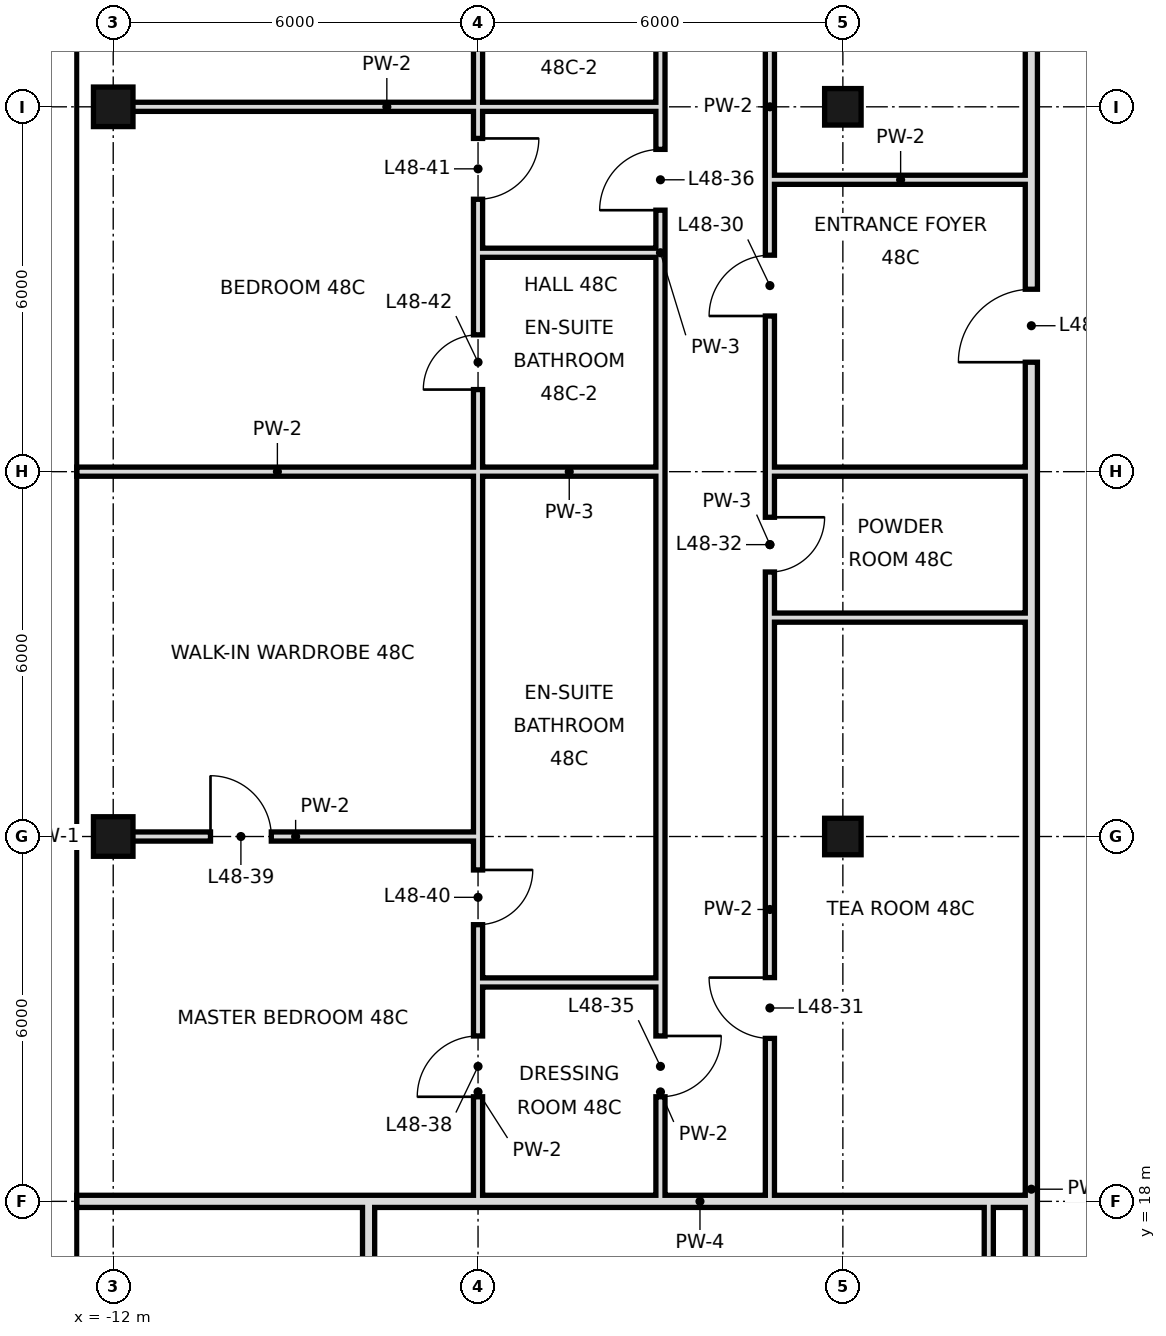
"""IFC4 building model, lengths in metres.
Left out: names, types, materials, properties, quantities, classifications, styles, units other than length and angle.
Written with IfcOpenShell. Run it as: python <this file> out.ifc"""

import sys

from ifc_helpers import new_model, si_unit, direction, frame, frame_2d, origin, origin_2d, place, context, subcontext, project, spatial, rectangle, hollow_rectangle, extrude, element, fill, save


model = new_model("IFC4")
c1 = context("Model", 3, precision=1e-05, world=origin(), true_north=direction((0.0, 1.0)))
c2 = subcontext(c1, "Body", "Model", "MODEL_VIEW")
j1 = project(units=[si_unit("LENGTHUNIT", "METRE"), si_unit("PLANEANGLEUNIT", "RADIAN")], contexts=[c1])
p1 = place(None, origin())
s1 = spatial("IfcSite", under=j1, at=p1, CompositionType="ELEMENT")
p2 = place(p1, origin())
s2 = spatial("IfcBuilding", under=s1, at=p2, CompositionType="ELEMENT")
p3 = place(p2, frame((0.0, 0.0, 206.4)))
s3 = spatial("IfcBuildingStorey", under=s2, at=p3, CompositionType="ELEMENT", Elevation=206.4)
for number, where, z_axis, x_axis in (
    (1, (-12.0, 24.0, 0.0), (0.0, 0.0, 1.0), (1.0, 0.0, 0.0)),
    (2, (-12.0, 36.0, 0.0), (0.0, 0.0, 1.0), (1.0, 0.0, 0.0)),
):
    element("IfcColumn", number, at=place(p3, frame(where, z_axis=z_axis, x_axis=x_axis)), inside=s3, PredefinedType="COLUMN", context=c2, shape_type="SweptSolid", body=[
        extrude(hollow_rectangle(XDim=0.65, YDim=0.65, WallThickness=0.032, at=origin_2d()), origin(), (0.0, 0.0, 1.0), 3.6),
    ])
for number, where, z_axis, x_axis in (
    (3, (0.0, 24.0, 0.0), (0.0, 0.0, 1.0), (1.0, 0.0, 0.0)),
    (4, (0.0, 36.0, 0.0), (0.0, 0.0, 1.0), (1.0, 0.0, 0.0)),
):
    element("IfcColumn", number, at=place(p3, frame(where, z_axis=z_axis, x_axis=x_axis)), inside=s3, PredefinedType="COLUMN", context=c2, shape_type="SweptSolid", body=[
        extrude(hollow_rectangle(XDim=0.6, YDim=0.6, WallThickness=0.028, at=origin_2d()), origin(), (0.0, 0.0, 1.0), 3.6),
    ])
p4 = place(p3, frame((-1.2, 18.0, 0.0), z_axis=(0.0, 0.0, 1.0), x_axis=(0.0, 1.0, 0.0)))
e5 = element("IfcWall", 5, at=p4, inside=s3, PredefinedType="PARTITIONING", context=c2, shape_type="SweptSolid", body=[
    extrude(rectangle(XDim=9.6, YDim=0.15, at=frame_2d((4.8, 0.0))), origin(), (0.0, 0.0, 1.0), 3.38),
])
p5 = place(p4, frame((2.68, 0.0, 0.0)))
e6 = element("IfcOpeningElement", 6, at=p5, cuts=e5, PredefinedType="OPENING", context=c2, shape_type="SweptSolid", body=[
    extrude(rectangle(XDim=1.0, YDim=2.4, at=frame_2d((0.5, 1.2))), frame((0.0, 0.085, 0.0), z_axis=(0.0, -1.0, 0.0), x_axis=(1.0, 0.0, 0.0)), (0.0, 0.0, 1.0), 0.17),
])
p6 = place(p3, frame((-1.2, 30.0, 0.0), z_axis=(0.0, 0.0, 1.0), x_axis=(0.0, 1.0, 0.0)))
e7 = element("IfcWall", 7, at=p6, inside=s3, PredefinedType="PARTITIONING", context=c2, shape_type="SweptSolid", body=[
    extrude(rectangle(XDim=12.0, YDim=0.15, at=frame_2d((6.0, 0.0))), origin(), (0.0, 0.0, 1.0), 3.38),
])
p7 = place(p6, frame((2.56, 0.0, 0.0)))
e8 = element("IfcOpeningElement", 8, at=p7, cuts=e7, PredefinedType="OPENING", context=c2, shape_type="SweptSolid", body=[
    extrude(rectangle(XDim=1.0, YDim=2.4, at=frame_2d((0.5, 1.2))), frame((0.0, 0.085, 0.0), z_axis=(0.0, -1.0, 0.0), x_axis=(1.0, 0.0, 0.0)), (0.0, 0.0, 1.0), 0.17),
])
p8 = place(p6, frame((9.04, 0.0, 0.0)))
e9 = element("IfcOpeningElement", 9, at=p8, cuts=e7, PredefinedType="OPENING", context=c2, shape_type="SweptSolid", body=[
    extrude(rectangle(XDim=1.0, YDim=2.4, at=frame_2d((0.5, 1.2))), frame((0.0, 0.085, 0.0), z_axis=(0.0, -1.0, 0.0), x_axis=(1.0, 0.0, 0.0)), (0.0, 0.0, 1.0), 0.17),
])
p9 = place(p3, frame((-1.2, 27.6, 0.0), z_axis=(0.0, 0.0, 1.0), x_axis=(0.0, 1.0, 0.0)))
e10 = element("IfcWall", 10, at=p9, inside=s3, PredefinedType="PARTITIONING", context=c2, shape_type="SweptSolid", body=[
    extrude(rectangle(XDim=2.4, YDim=0.15, at=frame_2d((1.2, 0.0))), origin(), (0.0, 0.0, 1.0), 3.38),
])
p10 = place(p9, frame((0.75, 0.0, 0.0)))
e11 = element("IfcOpeningElement", 11, at=p10, cuts=e10, PredefinedType="OPENING", context=c2, shape_type="SweptSolid", body=[
    extrude(rectangle(XDim=0.9, YDim=2.4, at=frame_2d((0.45, 1.2))), frame((0.0, 0.085, 0.0), z_axis=(0.0, -1.0, 0.0), x_axis=(1.0, 0.0, 0.0)), (0.0, 0.0, 1.0), 0.17),
])
p11 = place(p3, frame((-3.0, 18.0, 0.0), z_axis=(0.0, 0.0, 1.0), x_axis=(0.0, 1.0, 0.0)))
e12 = element("IfcWall", 12, at=p11, inside=s3, PredefinedType="PARTITIONING", context=c2, shape_type="SweptSolid", body=[
    extrude(rectangle(XDim=3.6, YDim=0.15, at=frame_2d((1.8, 0.0))), origin(), (0.0, 0.0, 1.0), 3.38),
])
p12 = place(p11, frame((1.72, 0.0, 0.0)))
e13 = element("IfcOpeningElement", 13, at=p12, cuts=e12, PredefinedType="OPENING", context=c2, shape_type="SweptSolid", body=[
    extrude(rectangle(XDim=1.0, YDim=2.4, at=frame_2d((0.5, 1.2))), frame((0.0, 0.085, 0.0), z_axis=(0.0, -1.0, 0.0), x_axis=(1.0, 0.0, 0.0)), (0.0, 0.0, 1.0), 0.17),
])
p13 = place(p3, frame((-3.0, 33.6, 0.0), z_axis=(0.0, 0.0, 1.0), x_axis=(0.0, 1.0, 0.0)))
e14 = element("IfcWall", 14, at=p13, inside=s3, PredefinedType="PARTITIONING", context=c2, shape_type="SweptSolid", body=[
    extrude(rectangle(XDim=15.0, YDim=0.15, at=frame_2d((7.5, 0.0))), origin(), (0.0, 0.0, 1.0), 3.38),
])
p14 = place(p13, frame((0.7, 0.0, 0.0)))
e15 = element("IfcOpeningElement", 15, at=p14, cuts=e14, PredefinedType="OPENING", context=c2, shape_type="SweptSolid", body=[
    extrude(rectangle(XDim=1.0, YDim=2.4, at=frame_2d((0.5, 1.2))), frame((0.0, 0.085, 0.0), z_axis=(0.0, -1.0, 0.0), x_axis=(1.0, 0.0, 0.0)), (0.0, 0.0, 1.0), 0.17),
])
p15 = place(p13, frame((5.56, 0.0, 0.0)))
e16 = element("IfcOpeningElement", 16, at=p15, cuts=e14, PredefinedType="OPENING", context=c2, shape_type="SweptSolid", body=[
    extrude(rectangle(XDim=1.8, YDim=2.4, at=frame_2d((0.9, 1.2))), frame((0.0, 0.085, 0.0), z_axis=(0.0, -1.0, 0.0), x_axis=(1.0, 0.0, 0.0)), (0.0, 0.0, 1.0), 0.17),
])
p16 = place(p3, frame((-3.0, 21.6, 0.0), z_axis=(0.0, 0.0, 1.0), x_axis=(0.0, 1.0, 0.0)))
e17 = element("IfcWall", 17, at=p16, inside=s3, PredefinedType="PARTITIONING", context=c2, shape_type="SweptSolid", body=[
    extrude(rectangle(XDim=12.0, YDim=0.15, at=frame_2d((6.0, 0.0))), origin(), (0.0, 0.0, 1.0), 3.38),
])
p17 = place(p3, frame((-6.0, 18.0, 0.0), z_axis=(0.0, 0.0, 1.0), x_axis=(0.0, 1.0, 0.0)))
e18 = element("IfcWall", 18, at=p17, inside=s3, PredefinedType="PARTITIONING", context=c2, shape_type="SweptSolid", body=[
    extrude(rectangle(XDim=3.6, YDim=0.15, at=frame_2d((1.8, 0.0))), origin(), (0.0, 0.0, 1.0), 3.38),
])
p18 = place(p17, frame((1.72, 0.0, 0.0)))
e19 = element("IfcOpeningElement", 19, at=p18, cuts=e18, PredefinedType="OPENING", context=c2, shape_type="SweptSolid", body=[
    extrude(rectangle(XDim=1.0, YDim=2.4, at=frame_2d((0.5, 1.2))), frame((0.0, 0.085, 0.0), z_axis=(0.0, -1.0, 0.0), x_axis=(1.0, 0.0, 0.0)), (0.0, 0.0, 1.0), 0.17),
])
p19 = place(p3, frame((-6.0, 33.6, 0.0), z_axis=(0.0, 0.0, 1.0), x_axis=(0.0, 1.0, 0.0)))
e20 = element("IfcWall", 20, at=p19, inside=s3, PredefinedType="PARTITIONING", context=c2, shape_type="SweptSolid", body=[
    extrude(rectangle(XDim=14.4, YDim=0.15, at=frame_2d((7.2, 0.0))), origin(), (0.0, 0.0, 1.0), 3.38),
])
p20 = place(p19, frame((0.88, 0.0, 0.0)))
e21 = element("IfcOpeningElement", 21, at=p20, cuts=e20, PredefinedType="OPENING", context=c2, shape_type="SweptSolid", body=[
    extrude(rectangle(XDim=1.0, YDim=2.4, at=frame_2d((0.5, 1.2))), frame((0.0, 0.085, 0.0), z_axis=(0.0, -1.0, 0.0), x_axis=(1.0, 0.0, 0.0)), (0.0, 0.0, 1.0), 0.17),
])
p21 = place(p19, frame((5.56, 0.0, 0.0)))
e22 = element("IfcOpeningElement", 22, at=p21, cuts=e20, PredefinedType="OPENING", context=c2, shape_type="SweptSolid", body=[
    extrude(rectangle(XDim=1.8, YDim=2.4, at=frame_2d((0.9, 1.2))), frame((0.0, 0.085, 0.0), z_axis=(0.0, -1.0, 0.0), x_axis=(1.0, 0.0, 0.0)), (0.0, 0.0, 1.0), 0.17),
])
p22 = place(p3, frame((-6.0, 21.6, 0.0), z_axis=(0.0, 0.0, 1.0), x_axis=(0.0, 1.0, 0.0)))
e23 = element("IfcWall", 23, at=p22, inside=s3, PredefinedType="PARTITIONING", context=c2, shape_type="SweptSolid", body=[
    extrude(rectangle(XDim=12.0, YDim=0.15, at=frame_2d((6.0, 0.0))), origin(), (0.0, 0.0, 1.0), 3.38),
])
p23 = place(p22, frame((0.95, 0.0, 0.0)))
e24 = element("IfcOpeningElement", 24, at=p23, cuts=e23, PredefinedType="OPENING", context=c2, shape_type="SweptSolid", body=[
    extrude(rectangle(XDim=0.9, YDim=2.4, at=frame_2d((0.45, 1.2))), frame((0.0, 0.085, 0.0), z_axis=(0.0, -1.0, 0.0), x_axis=(1.0, 0.0, 0.0)), (0.0, 0.0, 1.0), 0.17),
])
p24 = place(p22, frame((9.75, 0.0, 0.0)))
e25 = element("IfcOpeningElement", 25, at=p24, cuts=e23, PredefinedType="OPENING", context=c2, shape_type="SweptSolid", body=[
    extrude(rectangle(XDim=0.9, YDim=2.4, at=frame_2d((0.45, 1.2))), frame((0.0, 0.085, 0.0), z_axis=(0.0, -1.0, 0.0), x_axis=(1.0, 0.0, 0.0)), (0.0, 0.0, 1.0), 0.17),
])
p25 = place(p3, frame((-7.8, 10.8, 0.0), z_axis=(0.0, 0.0, 1.0), x_axis=(0.0, 1.0, 0.0)))
e26 = element("IfcWall", 26, at=p25, inside=s3, PredefinedType="SOLIDWALL", context=c2, shape_type="SweptSolid", body=[
    extrude(rectangle(XDim=7.2, YDim=0.2, at=frame_2d((3.6, 0.0))), origin(), (0.0, 0.0, 1.0), 2.68),
])
p26 = place(p3, frame((2.4, 10.8, 0.0), z_axis=(0.0, 0.0, 1.0), x_axis=(0.0, 1.0, 0.0)))
e27 = element("IfcWall", 27, at=p26, inside=s3, PredefinedType="PARTITIONING", context=c2, shape_type="SweptSolid", body=[
    extrude(rectangle(XDim=7.2, YDim=0.15, at=frame_2d((3.6, 0.0))), origin(), (0.0, 0.0, 1.0), 3.38),
])
p27 = place(p3, frame((3.1, 15.3, 0.0), z_axis=(0.0, 0.0, 1.0), x_axis=(0.0, 1.0, 0.0)))
e28 = element("IfcWall", 28, at=p27, inside=s3, PredefinedType="SOLIDWALL", context=c2, shape_type="SweptSolid", body=[
    extrude(rectangle(XDim=26.7, YDim=0.2, at=frame_2d((13.35, 0.0))), origin(), (0.0, 0.0, 1.0), 2.93),
])
p28 = place(p27, frame((16.5, 0.0, 0.0)))
e29 = element("IfcOpeningElement", 29, at=p28, cuts=e28, PredefinedType="OPENING", context=c2, shape_type="SweptSolid", body=[
    extrude(rectangle(XDim=1.2, YDim=2.4, at=frame_2d((0.6, 1.2))), frame((0.0, 0.11, 0.0), z_axis=(0.0, -1.0, 0.0), x_axis=(1.0, 0.0, 0.0)), (0.0, 0.0, 1.0), 0.22),
])
p29 = place(p3, frame((-12.6, 18.0, 0.0), z_axis=(0.0, 0.0, 1.0), x_axis=(1.0, 0.0, 0.0)))
e30 = element("IfcWall", 30, at=p29, inside=s3, PredefinedType="SOLIDWALL", context=c2, shape_type="SweptSolid", body=[
    extrude(rectangle(XDim=4.8, YDim=0.2, at=frame_2d((2.4, 0.0))), origin(), (0.0, 0.0, 1.0), 2.68),
])
p30 = place(p3, frame((-7.8, 18.0, 0.0), z_axis=(0.0, 0.0, 1.0), x_axis=(1.0, 0.0, 0.0)))
e31 = element("IfcWall", 31, at=p30, inside=s3, PredefinedType="SOLIDWALL", context=c2, shape_type="SweptSolid", body=[
    extrude(rectangle(XDim=10.9, YDim=0.2, at=frame_2d((5.45, 0.0))), origin(), (0.0, 0.0, 1.0), 2.68),
])
p31 = place(p3, frame((-6.0, 21.6, 0.0), z_axis=(0.0, 0.0, 1.0), x_axis=(1.0, 0.0, 0.0)))
e32 = element("IfcWall", 32, at=p31, inside=s3, PredefinedType="PARTITIONING", context=c2, shape_type="SweptSolid", body=[
    extrude(rectangle(XDim=3.0, YDim=0.15, at=frame_2d((1.5, 0.0))), origin(), (0.0, 0.0, 1.0), 3.38),
])
p32 = place(p3, frame((-12.0, 24.0, 0.0), z_axis=(0.0, 0.0, 1.0), x_axis=(1.0, 0.0, 0.0)))
e33 = element("IfcWall", 33, at=p32, inside=s3, PredefinedType="PARTITIONING", context=c2, shape_type="SweptSolid", body=[
    extrude(rectangle(XDim=6.0, YDim=0.15, at=frame_2d((3.0, 0.0))), origin(), (0.0, 0.0, 1.0), 2.68),
])
p33 = place(p32, frame((1.6, 0.0, 0.0)))
e34 = element("IfcOpeningElement", 34, at=p33, cuts=e33, PredefinedType="OPENING", context=c2, shape_type="SweptSolid", body=[
    extrude(rectangle(XDim=1.0, YDim=2.4, at=frame_2d((0.5, 1.2))), frame((0.0, 0.085, 0.0), z_axis=(0.0, -1.0, 0.0), x_axis=(1.0, 0.0, 0.0)), (0.0, 0.0, 1.0), 0.17),
])
p34 = place(p3, frame((-1.2, 27.6, 0.0), z_axis=(0.0, 0.0, 1.0), x_axis=(1.0, 0.0, 0.0)))
e35 = element("IfcWall", 35, at=p34, inside=s3, PredefinedType="PARTITIONING", context=c2, shape_type="SweptSolid", body=[
    extrude(rectangle(XDim=4.3, YDim=0.15, at=frame_2d((2.15, 0.0))), origin(), (0.0, 0.0, 1.0), 3.38),
])
p35 = place(p3, frame((-12.6, 30.0, 0.0), z_axis=(0.0, 0.0, 1.0), x_axis=(1.0, 0.0, 0.0)))
e36 = element("IfcWall", 36, at=p35, inside=s3, PredefinedType="PARTITIONING", context=c2, shape_type="SweptSolid", body=[
    extrude(rectangle(XDim=6.6, YDim=0.15, at=frame_2d((3.3, 0.0))), origin(), (0.0, 0.0, 1.0), 2.68),
])
p36 = place(p3, frame((-6.0, 30.0, 0.0), z_axis=(0.0, 0.0, 1.0), x_axis=(1.0, 0.0, 0.0)))
e37 = element("IfcWall", 37, at=p36, inside=s3, PredefinedType="PARTITIONING", context=c2, shape_type="SweptSolid", body=[
    extrude(rectangle(XDim=3.0, YDim=0.15, at=frame_2d((1.5, 0.0))), origin(), (0.0, 0.0, 1.0), 2.68),
])
p37 = place(p3, frame((-1.2, 30.0, 0.0), z_axis=(0.0, 0.0, 1.0), x_axis=(1.0, 0.0, 0.0)))
e38 = element("IfcWall", 38, at=p37, inside=s3, PredefinedType="PARTITIONING", context=c2, shape_type="SweptSolid", body=[
    extrude(rectangle(XDim=4.3, YDim=0.15, at=frame_2d((2.15, 0.0))), origin(), (0.0, 0.0, 1.0), 2.68),
])
p38 = place(p3, frame((-6.0, 33.6, 0.0), z_axis=(0.0, 0.0, 1.0), x_axis=(1.0, 0.0, 0.0)))
e39 = element("IfcWall", 39, at=p38, inside=s3, PredefinedType="PARTITIONING", context=c2, shape_type="SweptSolid", body=[
    extrude(rectangle(XDim=3.0, YDim=0.15, at=frame_2d((1.5, 0.0))), origin(), (0.0, 0.0, 1.0), 3.38),
])
p39 = place(p3, frame((-1.2, 34.8, 0.0), z_axis=(0.0, 0.0, 1.0), x_axis=(1.0, 0.0, 0.0)))
e40 = element("IfcWall", 40, at=p39, inside=s3, PredefinedType="PARTITIONING", context=c2, shape_type="SweptSolid", body=[
    extrude(rectangle(XDim=4.3, YDim=0.15, at=frame_2d((2.15, 0.0))), origin(), (0.0, 0.0, 1.0), 3.38),
])
p40 = place(p3, frame((-12.0, 36.0, 0.0), z_axis=(0.0, 0.0, 1.0), x_axis=(1.0, 0.0, 0.0)))
e41 = element("IfcWall", 41, at=p40, inside=s3, PredefinedType="PARTITIONING", context=c2, shape_type="SweptSolid", body=[
    extrude(rectangle(XDim=9.0, YDim=0.15, at=frame_2d((4.5, 0.0))), origin(), (0.0, 0.0, 1.0), 2.68),
])
p41 = place(p7, origin())
e42 = element("IfcDoor", 42, at=p41, inside=s3, OperationType="SINGLE_SWING_LEFT", PredefinedType="DOOR", context=c2, shape_type="SweptSolid", body=[
    extrude(rectangle(XDim=1.0, YDim=2.4, at=frame_2d((0.5, 1.2))), frame((0.0, 0.025, 0.0), z_axis=(0.0, -1.0, 0.0), x_axis=(1.0, 0.0, 0.0)), (0.0, 0.0, 1.0), 0.05),
])
fill(e8, e42)
p42 = place(p5, frame((1.0, 0.0, 0.0), z_axis=(0.0, 0.0, 1.0), x_axis=(-1.0, 0.0, 0.0)))
e43 = element("IfcDoor", 43, at=p42, inside=s3, OperationType="SINGLE_SWING_LEFT", PredefinedType="DOOR", context=c2, shape_type="SweptSolid", body=[
    extrude(rectangle(XDim=1.0, YDim=2.4, at=frame_2d((0.5, 1.2))), frame((0.0, 0.025, 0.0), z_axis=(0.0, -1.0, 0.0), x_axis=(1.0, 0.0, 0.0)), (0.0, 0.0, 1.0), 0.05),
])
fill(e6, e43)
p43 = place(p10, origin())
e44 = element("IfcDoor", 44, at=p43, inside=s3, OperationType="SINGLE_SWING_RIGHT", PredefinedType="DOOR", context=c2, shape_type="SweptSolid", body=[
    extrude(rectangle(XDim=0.9, YDim=2.4, at=frame_2d((0.45, 1.2))), frame((0.0, 0.025, 0.0), z_axis=(0.0, -1.0, 0.0), x_axis=(1.0, 0.0, 0.0)), (0.0, 0.0, 1.0), 0.05),
])
fill(e11, e44)
p44 = place(p12, origin())
e45 = element("IfcDoor", 45, at=p44, inside=s3, OperationType="SINGLE_SWING_RIGHT", PredefinedType="DOOR", context=c2, shape_type="SweptSolid", body=[
    extrude(rectangle(XDim=1.0, YDim=2.4, at=frame_2d((0.5, 1.2))), frame((0.0, 0.025, 0.0), z_axis=(0.0, -1.0, 0.0), x_axis=(1.0, 0.0, 0.0)), (0.0, 0.0, 1.0), 0.05),
])
fill(e13, e45)
p45 = place(p14, origin())
e46 = element("IfcDoor", 46, at=p45, inside=s3, OperationType="SINGLE_SWING_LEFT", PredefinedType="DOOR", context=c2, shape_type="SweptSolid", body=[
    extrude(rectangle(XDim=1.0, YDim=2.4, at=frame_2d((0.5, 1.2))), frame((0.0, 0.025, 0.0), z_axis=(0.0, -1.0, 0.0), x_axis=(1.0, 0.0, 0.0)), (0.0, 0.0, 1.0), 0.05),
])
fill(e15, e46)
p46 = place(p18, origin())
e47 = element("IfcDoor", 47, at=p46, inside=s3, OperationType="SINGLE_SWING_LEFT", PredefinedType="DOOR", context=c2, shape_type="SweptSolid", body=[
    extrude(rectangle(XDim=1.0, YDim=2.4, at=frame_2d((0.5, 1.2))), frame((0.0, 0.025, 0.0), z_axis=(0.0, -1.0, 0.0), x_axis=(1.0, 0.0, 0.0)), (0.0, 0.0, 1.0), 0.05),
])
fill(e19, e47)
p47 = place(p33, origin())
e48 = element("IfcDoor", 48, at=p47, inside=s3, OperationType="SINGLE_SWING_LEFT", PredefinedType="DOOR", context=c2, shape_type="SweptSolid", body=[
    extrude(rectangle(XDim=1.0, YDim=2.4, at=frame_2d((0.5, 1.2))), frame((0.0, 0.025, 0.0), z_axis=(0.0, -1.0, 0.0), x_axis=(1.0, 0.0, 0.0)), (0.0, 0.0, 1.0), 0.05),
])
fill(e34, e48)
p48 = place(p23, origin())
e49 = element("IfcDoor", 49, at=p48, inside=s3, OperationType="SINGLE_SWING_RIGHT", PredefinedType="DOOR", context=c2, shape_type="SweptSolid", body=[
    extrude(rectangle(XDim=0.9, YDim=2.4, at=frame_2d((0.45, 1.2))), frame((0.0, 0.025, 0.0), z_axis=(0.0, -1.0, 0.0), x_axis=(1.0, 0.0, 0.0)), (0.0, 0.0, 1.0), 0.05),
])
fill(e24, e49)
p49 = place(p20, origin())
e50 = element("IfcDoor", 50, at=p49, inside=s3, OperationType="SINGLE_SWING_RIGHT", PredefinedType="DOOR", context=c2, shape_type="SweptSolid", body=[
    extrude(rectangle(XDim=1.0, YDim=2.4, at=frame_2d((0.5, 1.2))), frame((0.0, 0.025, 0.0), z_axis=(0.0, -1.0, 0.0), x_axis=(1.0, 0.0, 0.0)), (0.0, 0.0, 1.0), 0.05),
])
fill(e21, e50)
p50 = place(p24, origin())
e51 = element("IfcDoor", 51, at=p50, inside=s3, OperationType="SINGLE_SWING_LEFT", PredefinedType="DOOR", context=c2, shape_type="SweptSolid", body=[
    extrude(rectangle(XDim=0.9, YDim=2.4, at=frame_2d((0.45, 1.2))), frame((0.0, 0.025, 0.0), z_axis=(0.0, -1.0, 0.0), x_axis=(1.0, 0.0, 0.0)), (0.0, 0.0, 1.0), 0.05),
])
fill(e25, e51)
p51 = place(p28, origin())
e52 = element("IfcDoor", 52, at=p51, inside=s3, OperationType="SINGLE_SWING_LEFT", PredefinedType="DOOR", context=c2, shape_type="SweptSolid", body=[
    extrude(rectangle(XDim=1.2, YDim=2.4, at=frame_2d((0.6, 1.2))), frame((0.0, 0.025, 0.0), z_axis=(0.0, -1.0, 0.0), x_axis=(1.0, 0.0, 0.0)), (0.0, 0.0, 1.0), 0.05),
])
fill(e29, e52)
save(model, sys.argv[1])
